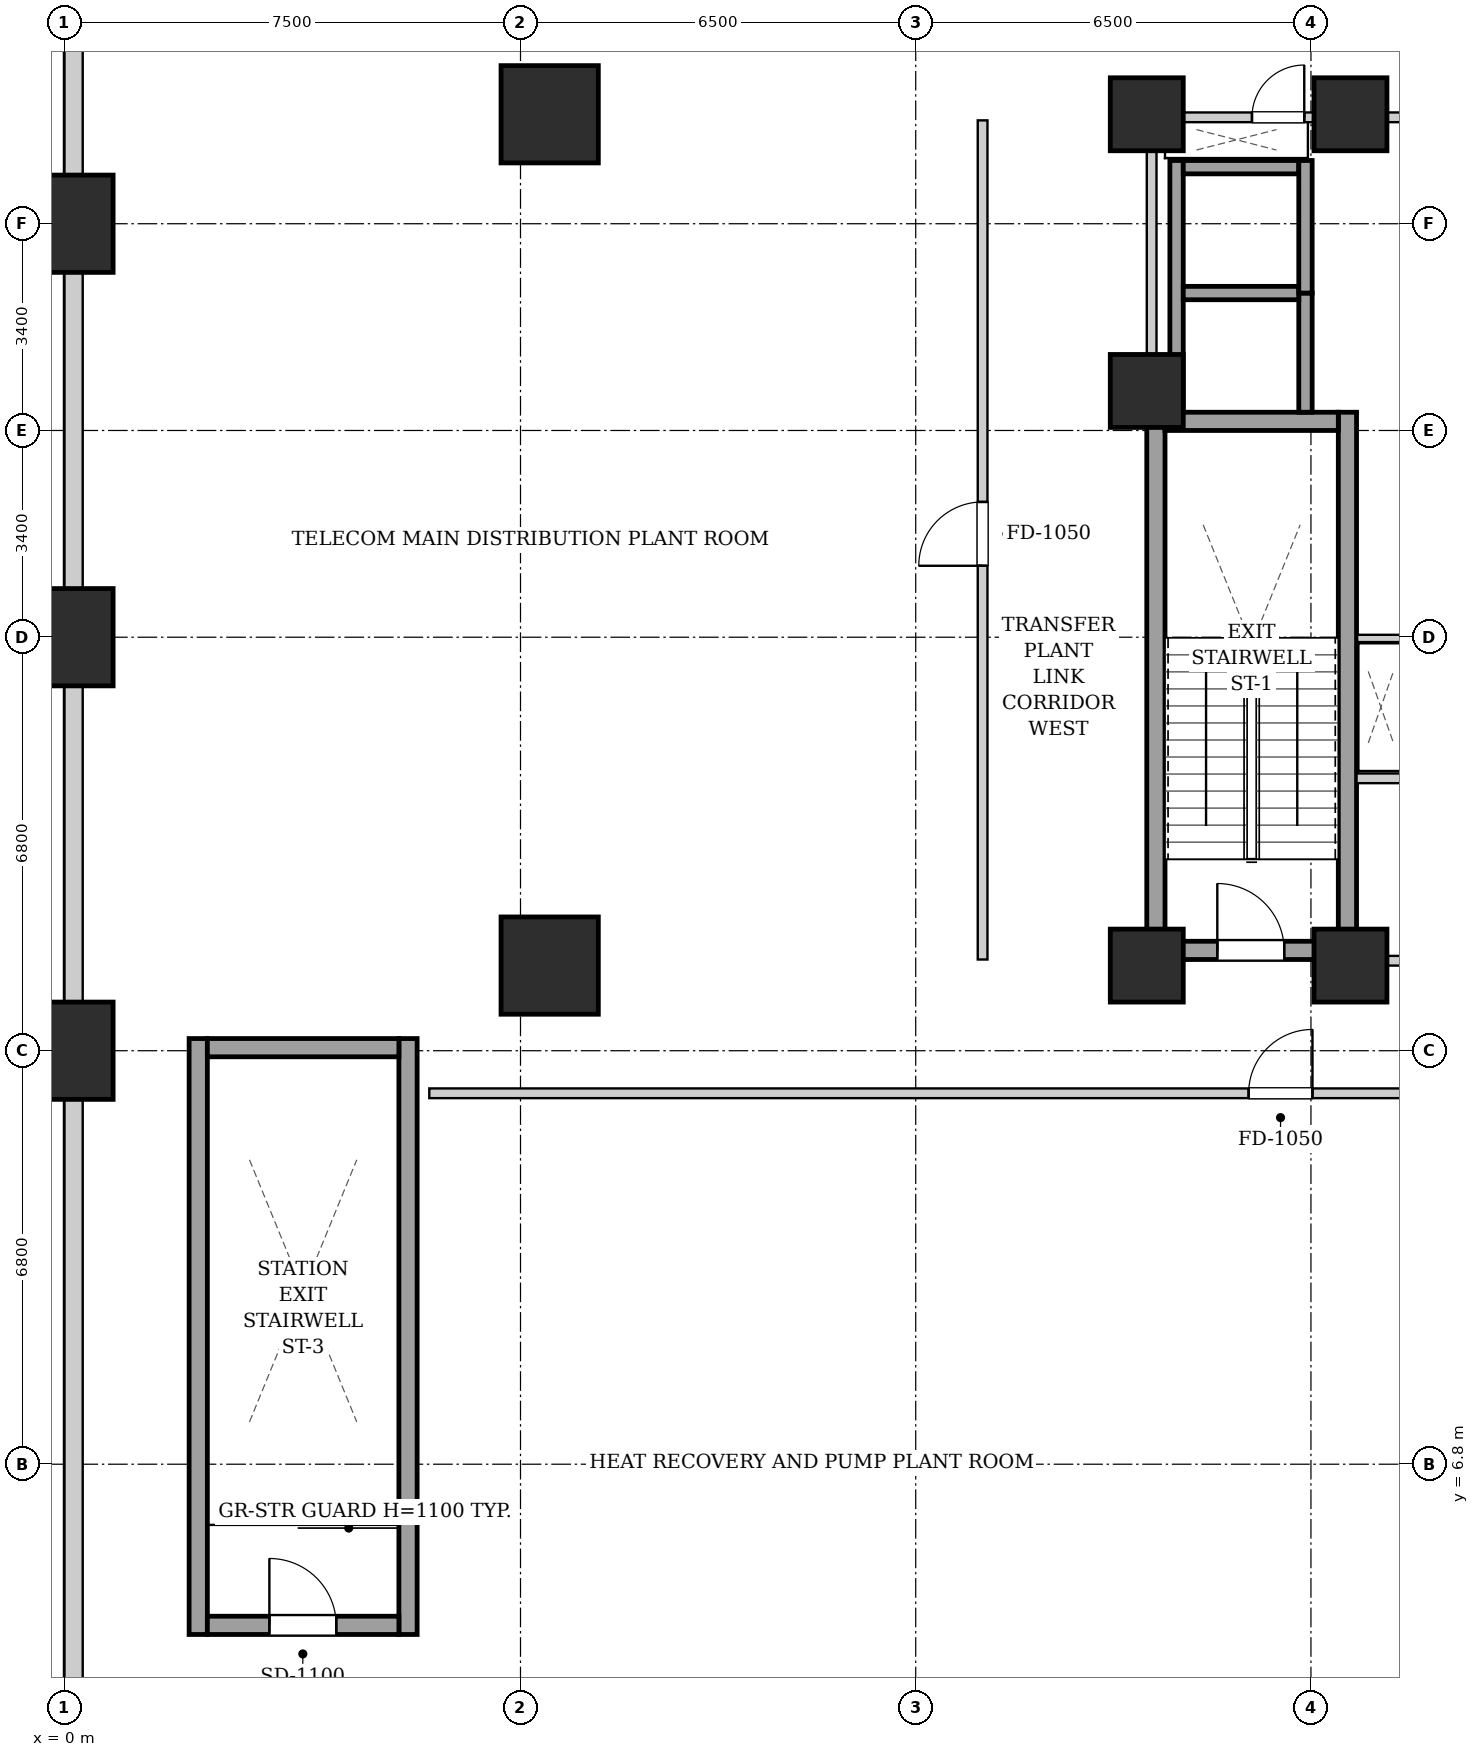
"""IFC4 building model, lengths in metres.
Left out: names, types, materials, properties, quantities, classifications, styles, units other than length and angle.
Written with IfcOpenShell. Run it as: python <this file> out.ifc"""

import sys

from ifc_helpers import new_model, si_unit, direction, frame, frame_2d, origin, origin_2d, place, context, subcontext, project, spatial, rectangle, extrude, element, fill, save


model = new_model("IFC4")
c1 = context("Model", 3, precision=1e-05, world=origin(), true_north=direction((0.0, 1.0)))
c2 = subcontext(c1, "Body", "Model", "MODEL_VIEW")
j1 = project(units=[si_unit("LENGTHUNIT", "METRE"), si_unit("PLANEANGLEUNIT", "RADIAN")], contexts=[c1])
p1 = place(None, origin())
s1 = spatial("IfcSite", under=j1, at=p1, CompositionType="ELEMENT")
p2 = place(p1, origin())
s2 = spatial("IfcBuilding", under=s1, at=p2, CompositionType="ELEMENT")
p3 = place(p2, frame((0.0, 0.0, 20.8)))
s3 = spatial("IfcBuildingStorey", under=s2, at=p3, CompositionType="ELEMENT", Elevation=20.8)
for number, where, z_axis, x_axis in (
    (1, (0.0, 13.6, 0.0), (0.0, 0.0, 1.0), (1.0, 0.0, 0.0)),
    (2, (0.0, 20.4, 0.0), (0.0, 0.0, 1.0), (1.0, 0.0, 0.0)),
    (3, (0.0, 27.2, 0.0), (0.0, 0.0, 1.0), (1.0, 0.0, 0.0)),
    (4, (7.98, 15.0, 0.0), (0.0, 0.0, 1.0), (1.0, 0.0, 0.0)),
    (5, (7.98, 29.0, 0.0), (0.0, 0.0, 1.0), (1.0, 0.0, 0.0)),
):
    element("IfcColumn", number, at=place(p3, frame(where, z_axis=z_axis, x_axis=x_axis)), inside=s3, PredefinedType="COLUMN", context=c2, shape_type="SweptSolid", body=[
        extrude(rectangle(XDim=1.6, YDim=1.6, at=origin_2d()), origin(), (0.0, 0.0, 1.0), 5.0),
    ])
for number, where, z_axis, x_axis in (
    (6, (17.8, 15.0, 0.0), (0.0, 0.0, 1.0), (1.0, 0.0, 0.0)),
    (7, (21.15, 15.0, 0.0), (0.0, 0.0, 1.0), (1.0, 0.0, 0.0)),
    (8, (17.8, 29.0, 0.0), (0.0, 0.0, 1.0), (1.0, 0.0, 0.0)),
    (9, (21.15, 29.0, 0.0), (0.0, 0.0, 1.0), (1.0, 0.0, 0.0)),
    (10, (17.8, 24.45, 0.0), (0.0, 0.0, 1.0), (1.0, 0.0, 0.0)),
):
    element("IfcColumn", number, at=place(p3, frame(where, z_axis=z_axis, x_axis=x_axis)), inside=s3, PredefinedType="COLUMN", context=c2, shape_type="SweptSolid", body=[
        extrude(rectangle(XDim=1.2, YDim=1.2, at=origin_2d()), origin(), (0.0, 0.0, 1.0), 5.0),
    ])
p4 = place(p3, frame((0.15, 0.16, 0.0), z_axis=(0.0, 0.0, 1.0), x_axis=(0.0, 1.0, 0.0)))
e11 = element("IfcWall", 11, at=p4, inside=s3, PredefinedType="SOLIDWALL", context=c2, shape_type="SweptSolid", body=[
    extrude(rectangle(XDim=47.28, YDim=0.3, at=frame_2d((23.64, 0.0))), origin(), (0.0, 0.0, 1.0), 3.625),
])
for number, where, z_axis, x_axis in (
    (12, (17.95, 15.1, 0.0), (0.0, 0.0, 1.0), (0.0, 1.0, 0.0)),
    (13, (21.1, 15.1, 0.0), (0.0, 0.0, 1.0), (0.0, 1.0, 0.0)),
):
    element("IfcWall", number, at=place(p3, frame(where, z_axis=z_axis, x_axis=x_axis)), inside=s3, PredefinedType="SHEAR", context=c2, shape_type="SweptSolid", body=[
        extrude(rectangle(XDim=9.0, YDim=0.3, at=frame_2d((4.5, 0.0))), origin(), (0.0, 0.0, 1.0), 4.74),
    ])
p5 = place(p3, frame((18.1, 23.95, 0.0), z_axis=(0.0, 0.0, 1.0), x_axis=(1.0, 0.0, 0.0)))
e14 = element("IfcWall", 14, at=p5, inside=s3, PredefinedType="SHEAR", context=c2, shape_type="SweptSolid", body=[
    extrude(rectangle(XDim=2.85, YDim=0.3, at=frame_2d((1.425, 0.0))), origin(), (0.0, 0.0, 1.0), 4.74),
])
p6 = place(p3, frame((18.1, 15.25, 0.0), z_axis=(0.0, 0.0, 1.0), x_axis=(1.0, 0.0, 0.0)))
e15 = element("IfcWall", 15, at=p6, inside=s3, PredefinedType="SHEAR", context=c2, shape_type="SweptSolid", body=[
    extrude(rectangle(XDim=2.85, YDim=0.3, at=frame_2d((1.425, 0.0))), origin(), (0.0, 0.0, 1.0), 4.74),
])
p7 = place(p6, frame((0.86, 0.0, 0.0)))
e16 = element("IfcOpeningElement", 16, at=p7, cuts=e15, PredefinedType="OPENING", context=c2, shape_type="SweptSolid", body=[
    extrude(rectangle(XDim=1.1, YDim=2.05, at=frame_2d((0.55, 1.025))), frame((0.0, 0.16, 0.0), z_axis=(0.0, -1.0, 0.0), x_axis=(1.0, 0.0, 0.0)), (0.0, 0.0, 1.0), 0.32),
])
for number, where, z_axis, x_axis in (
    (17, (2.2, 4.0, 0.0), (0.0, 0.0, 1.0), (0.0, 1.0, 0.0)),
    (18, (5.65, 4.0, 0.0), (0.0, 0.0, 1.0), (0.0, 1.0, 0.0)),
):
    element("IfcWall", number, at=place(p3, frame(where, z_axis=z_axis, x_axis=x_axis)), inside=s3, PredefinedType="SHEAR", context=c2, shape_type="SweptSolid", body=[
        extrude(rectangle(XDim=9.8, YDim=0.3, at=frame_2d((4.9, 0.0))), origin(), (0.0, 0.0, 1.0), 4.74),
    ])
p8 = place(p3, frame((2.35, 13.65, 0.0), z_axis=(0.0, 0.0, 1.0), x_axis=(1.0, 0.0, 0.0)))
e19 = element("IfcWall", 19, at=p8, inside=s3, PredefinedType="SHEAR", context=c2, shape_type="SweptSolid", body=[
    extrude(rectangle(XDim=3.15, YDim=0.3, at=frame_2d((1.575, 0.0))), origin(), (0.0, 0.0, 1.0), 4.74),
])
p9 = place(p3, frame((2.35, 4.15, 0.0), z_axis=(0.0, 0.0, 1.0), x_axis=(1.0, 0.0, 0.0)))
e20 = element("IfcWall", 20, at=p9, inside=s3, PredefinedType="SHEAR", context=c2, shape_type="SweptSolid", body=[
    extrude(rectangle(XDim=3.15, YDim=0.3, at=frame_2d((1.575, 0.0))), origin(), (0.0, 0.0, 1.0), 4.74),
])
p10 = place(p9, frame((1.02, 0.0, 0.0)))
e21 = element("IfcOpeningElement", 21, at=p10, cuts=e20, PredefinedType="OPENING", context=c2, shape_type="SweptSolid", body=[
    extrude(rectangle(XDim=1.1, YDim=2.05, at=frame_2d((0.55, 1.025))), frame((0.0, 0.16, 0.0), z_axis=(0.0, -1.0, 0.0), x_axis=(1.0, 0.0, 0.0)), (0.0, 0.0, 1.0), 0.32),
])
p11 = place(p3, frame((18.29, 24.1, 0.0), z_axis=(0.0, 0.0, 1.0), x_axis=(0.0, 1.0, 0.0)))
e22 = element("IfcWall", 22, at=p11, inside=s3, PredefinedType="SHEAR", context=c2, shape_type="SweptSolid", body=[
    extrude(rectangle(XDim=4.14, YDim=0.22, at=frame_2d((2.07, 0.0))), origin(), (0.0, 0.0, 1.0), 4.74),
])
p12 = place(p3, frame((20.41, 24.1, 0.0), z_axis=(0.0, 0.0, 1.0), x_axis=(0.0, 1.0, 0.0)))
e23 = element("IfcWall", 23, at=p12, inside=s3, PredefinedType="SHEAR", context=c2, shape_type="SweptSolid", body=[
    extrude(rectangle(XDim=1.96, YDim=0.22, at=frame_2d((0.98, 0.0))), origin(), (0.0, 0.0, 1.0), 4.74),
])
for number, where, z_axis, x_axis in (
    (24, (18.4, 26.06, 0.0), (0.0, 0.0, 1.0), (1.0, 0.0, 0.0)),
    (25, (18.4, 28.13, 0.0), (0.0, 0.0, 1.0), (1.0, 0.0, 0.0)),
):
    element("IfcWall", number, at=place(p3, frame(where, z_axis=z_axis, x_axis=x_axis)), inside=s3, PredefinedType="SHEAR", context=c2, shape_type="SweptSolid", body=[
        extrude(rectangle(XDim=1.9, YDim=0.22, at=frame_2d((0.95, 0.0))), origin(), (0.0, 0.0, 1.0), 4.74),
    ])
p13 = place(p3, frame((20.41, 26.06, 0.0), z_axis=(0.0, 0.0, 1.0), x_axis=(0.0, 1.0, 0.0)))
e26 = element("IfcWall", 26, at=p13, inside=s3, PredefinedType="SHEAR", context=c2, shape_type="SweptSolid", body=[
    extrude(rectangle(XDim=2.18, YDim=0.22, at=frame_2d((1.09, 0.0))), origin(), (0.0, 0.0, 1.0), 4.74),
])
p14 = place(p3, frame((21.25, 15.08, 0.0), z_axis=(0.0, 0.0, 1.0), x_axis=(1.0, 0.0, 0.0)))
e27 = element("IfcWall", 27, at=p14, inside=s3, PredefinedType="PARTITIONING", context=c2, shape_type="SweptSolid", body=[
    extrude(rectangle(XDim=8.5, YDim=0.16, at=frame_2d((4.25, 0.0))), origin(), (0.0, 0.0, 1.0), 4.74),
])
p15 = place(p14, frame((3.725, 0.0, 0.0)))
e28 = element("IfcOpeningElement", 28, at=p15, cuts=e27, PredefinedType="OPENING", context=c2, shape_type="SweptSolid", body=[
    extrude(rectangle(XDim=1.05, YDim=2.05, at=frame_2d((0.525, 1.025))), frame((0.0, 0.09, 0.0), z_axis=(0.0, -1.0, 0.0), x_axis=(1.0, 0.0, 0.0)), (0.0, 0.0, 1.0), 0.18),
])
p16 = place(p3, frame((21.25, 18.08, 0.0), z_axis=(0.0, 0.0, 1.0), x_axis=(1.0, 0.0, 0.0)))
e29 = element("IfcWall", 29, at=p16, inside=s3, PredefinedType="PARTITIONING", context=c2, shape_type="SweptSolid", body=[
    extrude(rectangle(XDim=1.1, YDim=0.16, at=frame_2d((0.55, 0.0))), origin(), (0.0, 0.0, 1.0), 4.74),
])
p17 = place(p3, frame((17.88, 24.12, 0.0), z_axis=(0.0, 0.0, 1.0), x_axis=(0.0, 1.0, 0.0)))
e30 = element("IfcWall", 30, at=p17, inside=s3, PredefinedType="PARTITIONING", context=c2, shape_type="SweptSolid", body=[
    extrude(rectangle(XDim=4.76, YDim=0.16, at=frame_2d((2.38, 0.0))), origin(), (0.0, 0.0, 1.0), 4.74),
])
p18 = place(p3, frame((17.96, 28.95, 0.0), z_axis=(0.0, 0.0, 1.0), x_axis=(1.0, 0.0, 0.0)))
e31 = element("IfcWall", 31, at=p18, inside=s3, PredefinedType="PARTITIONING", context=c2, shape_type="SweptSolid", body=[
    extrude(rectangle(XDim=4.29, YDim=0.16, at=frame_2d((2.145, 0.0))), origin(), (0.0, 0.0, 1.0), 4.74),
])
p19 = place(p18, frame((1.57, 0.0, 0.0)))
e32 = element("IfcOpeningElement", 32, at=p19, cuts=e31, PredefinedType="OPENING", context=c2, shape_type="SweptSolid", body=[
    extrude(rectangle(XDim=0.86, YDim=2.05, at=frame_2d((0.43, 1.025))), frame((0.0, 0.09, 0.0), z_axis=(0.0, -1.0, 0.0), x_axis=(1.0, 0.0, 0.0)), (0.0, 0.0, 1.0), 0.18),
])
p20 = place(p3, frame((22.28, 20.38, 0.0), z_axis=(0.0, 0.0, 1.0), x_axis=(-1.0, 0.0, 0.0)))
e33 = element("IfcWall", 33, at=p20, inside=s3, PredefinedType="PARTITIONING", context=c2, shape_type="SweptSolid", body=[
    extrude(rectangle(XDim=1.02, YDim=0.12, at=frame_2d((0.51, 0.0))), origin(), (0.0, 0.0, 1.0), 4.74),
])
p21 = place(p3, frame((6.0, 12.9, 0.0), z_axis=(0.0, 0.0, 1.0), x_axis=(1.0, 0.0, 0.0)))
e34 = element("IfcWall", 34, at=p21, inside=s3, PredefinedType="PARTITIONING", context=c2, shape_type="SweptSolid", body=[
    extrude(rectangle(XDim=47.2, YDim=0.16, at=frame_2d((23.6, 0.0))), origin(), (0.0, 0.0, 1.0), 4.74),
])
p22 = place(p21, frame((13.475, 0.0, 0.0)))
e35 = element("IfcOpeningElement", 35, at=p22, cuts=e34, PredefinedType="OPENING", context=c2, shape_type="SweptSolid", body=[
    extrude(rectangle(XDim=1.05, YDim=2.05, at=frame_2d((0.525, 1.025))), frame((0.0, 0.09, 0.0), z_axis=(0.0, -1.0, 0.0), x_axis=(1.0, 0.0, 0.0)), (0.0, 0.0, 1.0), 0.18),
])
p23 = place(p21, frame((34.975, 0.0, 0.0)))
e36 = element("IfcOpeningElement", 36, at=p23, cuts=e34, PredefinedType="OPENING", context=c2, shape_type="SweptSolid", body=[
    extrude(rectangle(XDim=1.05, YDim=2.05, at=frame_2d((0.525, 1.025))), frame((0.0, 0.09, 0.0), z_axis=(0.0, -1.0, 0.0), x_axis=(1.0, 0.0, 0.0)), (0.0, 0.0, 1.0), 0.18),
])
p24 = place(p3, frame((15.1, 15.1, 0.0), z_axis=(0.0, 0.0, 1.0), x_axis=(0.0, 1.0, 0.0)))
e37 = element("IfcWall", 37, at=p24, inside=s3, PredefinedType="PARTITIONING", context=c2, shape_type="SweptSolid", body=[
    extrude(rectangle(XDim=13.8, YDim=0.16, at=frame_2d((6.9, 0.0))), origin(), (0.0, 0.0, 1.0), 4.74),
])
p25 = place(p24, frame((6.475, 0.0, 0.0)))
e38 = element("IfcOpeningElement", 38, at=p25, cuts=e37, PredefinedType="OPENING", context=c2, shape_type="SweptSolid", body=[
    extrude(rectangle(XDim=1.05, YDim=2.05, at=frame_2d((0.525, 1.025))), frame((0.0, 0.09, 0.0), z_axis=(0.0, -1.0, 0.0), x_axis=(1.0, 0.0, 0.0)), (0.0, 0.0, 1.0), 0.18),
])
p26 = place(p7, origin())
e39 = element("IfcDoor", 39, at=p26, inside=s3, OperationType="SINGLE_SWING_LEFT", PredefinedType="DOOR", context=c2, shape_type="SweptSolid", body=[
    extrude(rectangle(XDim=1.1, YDim=2.05, at=frame_2d((0.55, 1.025))), frame((0.0, 0.025, 0.0), z_axis=(0.0, -1.0, 0.0), x_axis=(1.0, 0.0, 0.0)), (0.0, 0.0, 1.0), 0.05),
])
fill(e16, e39)
p27 = place(p10, origin())
e40 = element("IfcDoor", 40, at=p27, inside=s3, OperationType="SINGLE_SWING_LEFT", PredefinedType="DOOR", context=c2, shape_type="SweptSolid", body=[
    extrude(rectangle(XDim=1.1, YDim=2.05, at=frame_2d((0.55, 1.025))), frame((0.0, 0.025, 0.0), z_axis=(0.0, -1.0, 0.0), x_axis=(1.0, 0.0, 0.0)), (0.0, 0.0, 1.0), 0.05),
])
fill(e21, e40)
p28 = place(p19, origin())
e41 = element("IfcDoor", 41, at=p28, inside=s3, OperationType="SINGLE_SWING_RIGHT", PredefinedType="DOOR", context=c2, shape_type="SweptSolid", body=[
    extrude(rectangle(XDim=0.86, YDim=2.05, at=frame_2d((0.43, 1.025))), frame((0.0, 0.025, 0.0), z_axis=(0.0, -1.0, 0.0), x_axis=(1.0, 0.0, 0.0)), (0.0, 0.0, 1.0), 0.05),
])
fill(e32, e41)
p29 = place(p22, origin())
e42 = element("IfcDoor", 42, at=p29, inside=s3, OperationType="SINGLE_SWING_RIGHT", PredefinedType="DOOR", context=c2, shape_type="SweptSolid", body=[
    extrude(rectangle(XDim=1.05, YDim=2.05, at=frame_2d((0.525, 1.025))), frame((0.0, 0.025, 0.0), z_axis=(0.0, -1.0, 0.0), x_axis=(1.0, 0.0, 0.0)), (0.0, 0.0, 1.0), 0.05),
])
fill(e35, e42)
p30 = place(p25, origin())
e43 = element("IfcDoor", 43, at=p30, inside=s3, OperationType="SINGLE_SWING_LEFT", PredefinedType="DOOR", context=c2, shape_type="SweptSolid", body=[
    extrude(rectangle(XDim=1.05, YDim=2.05, at=frame_2d((0.525, 1.025))), frame((0.0, 0.025, 0.0), z_axis=(0.0, -1.0, 0.0), x_axis=(1.0, 0.0, 0.0)), (0.0, 0.0, 1.0), 0.05),
])
fill(e38, e43)
save(model, sys.argv[1])
